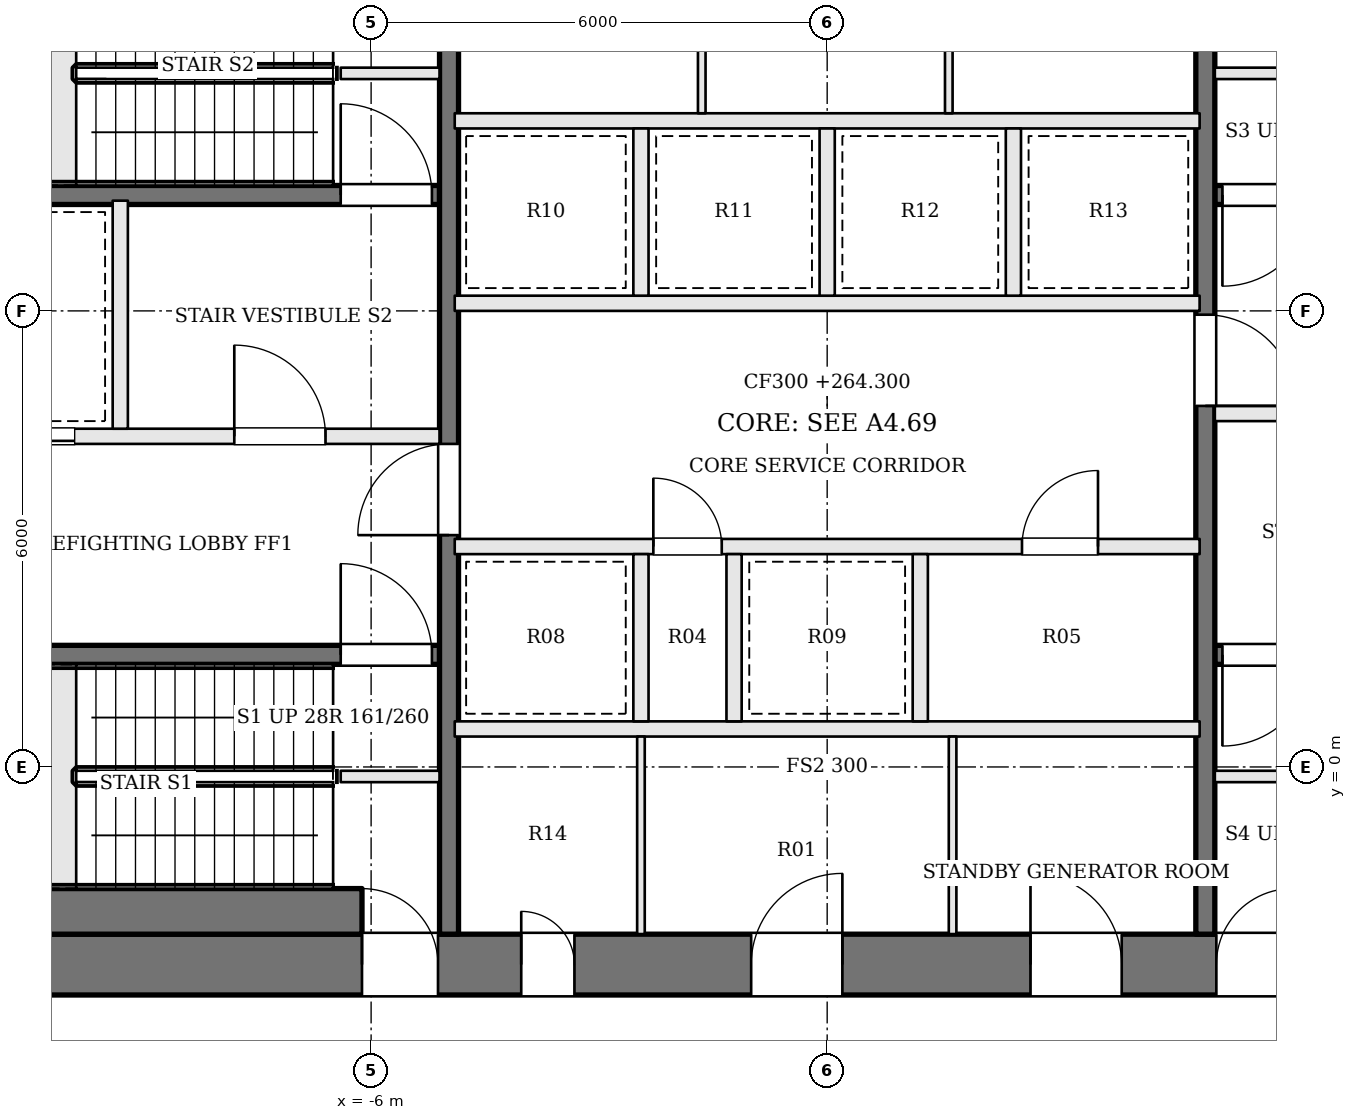
"""IFC4 building model, lengths in metres.
Left out: names, types, materials, properties, quantities, classifications, styles, units other than length and angle.
Written with IfcOpenShell. Run it as: python <this file> out.ifc"""

import sys

from ifc_helpers import new_model, si_unit, direction, frame, frame_2d, origin, place, context, subcontext, project, spatial, rectangle, extrude, element, fill, save


model = new_model("IFC4")
c1 = context("Model", 3, precision=1e-05, world=origin(), true_north=direction((0.0, 1.0)))
c2 = subcontext(c1, "Body", "Model", "MODEL_VIEW")
j1 = project(units=[si_unit("LENGTHUNIT", "METRE"), si_unit("PLANEANGLEUNIT", "RADIAN")], contexts=[c1])
p1 = place(None, origin())
s1 = spatial("IfcSite", under=j1, at=p1, CompositionType="ELEMENT")
p2 = place(p1, origin())
s2 = spatial("IfcBuilding", under=s1, at=p2, CompositionType="ELEMENT")
p3 = place(p2, frame((0.0, 0.0, 264.3)))
s3 = spatial("IfcBuildingStorey", under=s2, at=p3, CompositionType="ELEMENT", Elevation=264.3)
p4 = place(p3, frame((-13.0, -2.6, 0.0), z_axis=(0.0, 0.0, 1.0), x_axis=(1.0, 0.0, 0.0)))
e1 = element("IfcWall", 1, at=p4, inside=s3, PredefinedType="SHEAR", context=c2, shape_type="SweptSolid", body=[
    extrude(rectangle(XDim=26.0, YDim=0.8, at=frame_2d((13.0, 0.0))), origin(), (0.0, 0.0, 1.0), 4.5),
])
p5 = place(p4, frame((8.975, 0.0, 0.0)))
e2 = element("IfcOpeningElement", 2, at=p5, cuts=e1, PredefinedType="OPENING", context=c2, shape_type="SweptSolid", body=[
    extrude(rectangle(XDim=0.7, YDim=2.1, at=frame_2d((0.35, 1.05))), frame((0.0, 0.41, 0.0), z_axis=(0.0, -1.0, 0.0), x_axis=(1.0, 0.0, 0.0)), (0.0, 0.0, 1.0), 0.82),
])
p6 = place(p4, frame((12.0, 0.0, 0.0)))
e3 = element("IfcOpeningElement", 3, at=p6, cuts=e1, PredefinedType="OPENING", context=c2, shape_type="SweptSolid", body=[
    extrude(rectangle(XDim=1.2, YDim=2.1, at=frame_2d((0.6, 1.05))), frame((0.0, 0.41, 0.0), z_axis=(0.0, -1.0, 0.0), x_axis=(1.0, 0.0, 0.0)), (0.0, 0.0, 1.0), 0.82),
])
p7 = place(p4, frame((15.675, 0.0, 0.0)))
e4 = element("IfcOpeningElement", 4, at=p7, cuts=e1, PredefinedType="OPENING", context=c2, shape_type="SweptSolid", body=[
    extrude(rectangle(XDim=1.2, YDim=2.1, at=frame_2d((0.6, 1.05))), frame((0.0, 0.41, 0.0), z_axis=(0.0, -1.0, 0.0), x_axis=(1.0, 0.0, 0.0)), (0.0, 0.0, 1.0), 0.82),
])
p8 = place(p4, frame((6.88, 0.0, 0.0)))
e5 = element("IfcOpeningElement", 5, at=p8, cuts=e1, PredefinedType="OPENING", context=c2, shape_type="SweptSolid", body=[
    extrude(rectangle(XDim=1.0, YDim=2.1, at=frame_2d((0.5, 1.05))), frame((0.0, 0.41, 0.0), z_axis=(0.0, -1.0, 0.0), x_axis=(1.0, 0.0, 0.0)), (0.0, 0.0, 1.0), 0.82),
])
p9 = place(p4, frame((18.12, 0.0, 0.0)))
e6 = element("IfcOpeningElement", 6, at=p9, cuts=e1, PredefinedType="OPENING", context=c2, shape_type="SweptSolid", body=[
    extrude(rectangle(XDim=1.0, YDim=2.1, at=frame_2d((0.5, 1.05))), frame((0.0, 0.41, 0.0), z_axis=(0.0, -1.0, 0.0), x_axis=(1.0, 0.0, 0.0)), (0.0, 0.0, 1.0), 0.82),
])
for number, where, z_axis, x_axis in (
    (7, (-6.4, -0.125, 0.0), (0.0, 0.0, 1.0), (1.0, 0.0, 0.0)),
    (8, (6.4, 9.125, 0.0), (0.0, 0.0, 1.0), (-1.0, 0.0, 0.0)),
    (9, (-6.4, 9.125, 0.0), (0.0, 0.0, 1.0), (1.0, 0.0, 0.0)),
    (10, (6.4, -0.125, 0.0), (0.0, 0.0, 1.0), (-1.0, 0.0, 0.0)),
):
    element("IfcWall", number, at=place(p3, frame(where, z_axis=z_axis, x_axis=x_axis)), inside=s3, PredefinedType="SOLIDWALL", context=c2, shape_type="SweptSolid", body=[
        extrude(rectangle(XDim=1.3, YDim=0.15, at=frame_2d((0.65, 0.0))), origin(), (0.0, 0.0, 1.0), 4.3),
    ])
p10 = place(p3, frame((-12.2, 1.475, 0.0), z_axis=(0.0, 0.0, 1.0), x_axis=(1.0, 0.0, 0.0)))
e11 = element("IfcWall", 11, at=p10, inside=s3, PredefinedType="SOLIDWALL", context=c2, shape_type="SweptSolid", body=[
    extrude(rectangle(XDim=7.1, YDim=0.25, at=frame_2d((3.55, 0.0))), origin(), (0.0, 0.0, 1.0), 4.3),
])
p11 = place(p10, frame((5.8, 0.0, 0.0)))
e12 = element("IfcOpeningElement", 12, at=p11, cuts=e11, PredefinedType="OPENING", context=c2, shape_type="SweptSolid", body=[
    extrude(rectangle(XDim=1.2, YDim=2.1, at=frame_2d((0.6, 1.05))), frame((0.0, 0.135, 0.0), z_axis=(0.0, -1.0, 0.0), x_axis=(1.0, 0.0, 0.0)), (0.0, 0.0, 1.0), 0.27),
])
p12 = place(p3, frame((12.2, 7.525, 0.0), z_axis=(0.0, 0.0, 1.0), x_axis=(-1.0, 0.0, 0.0)))
e13 = element("IfcWall", 13, at=p12, inside=s3, PredefinedType="SOLIDWALL", context=c2, shape_type="SweptSolid", body=[
    extrude(rectangle(XDim=7.1, YDim=0.25, at=frame_2d((3.55, 0.0))), origin(), (0.0, 0.0, 1.0), 4.3),
])
p13 = place(p12, frame((5.8, 0.0, 0.0)))
e14 = element("IfcOpeningElement", 14, at=p13, cuts=e13, PredefinedType="OPENING", context=c2, shape_type="SweptSolid", body=[
    extrude(rectangle(XDim=1.2, YDim=2.1, at=frame_2d((0.6, 1.05))), frame((0.0, 0.135, 0.0), z_axis=(0.0, -1.0, 0.0), x_axis=(1.0, 0.0, 0.0)), (0.0, 0.0, 1.0), 0.27),
])
p14 = place(p3, frame((-12.2, 4.35, 0.0), z_axis=(0.0, 0.0, 1.0), x_axis=(1.0, 0.0, 0.0)))
e15 = element("IfcWall", 15, at=p14, inside=s3, PredefinedType="SOLIDWALL", context=c2, shape_type="SweptSolid", body=[
    extrude(rectangle(XDim=7.1, YDim=0.2, at=frame_2d((3.55, 0.0))), origin(), (0.0, 0.0, 1.0), 4.3),
])
p15 = place(p14, frame((4.4, 0.0, 0.0)))
e16 = element("IfcOpeningElement", 16, at=p15, cuts=e15, PredefinedType="OPENING", context=c2, shape_type="SweptSolid", body=[
    extrude(rectangle(XDim=1.2, YDim=2.1, at=frame_2d((0.6, 1.05))), frame((0.0, 0.11, 0.0), z_axis=(0.0, -1.0, 0.0), x_axis=(1.0, 0.0, 0.0)), (0.0, 0.0, 1.0), 0.22),
])
p16 = place(p14, frame((1.1, 0.0, 0.0)))
e17 = element("IfcOpeningElement", 17, at=p16, cuts=e15, PredefinedType="OPENING", context=c2, shape_type="SweptSolid", body=[
    extrude(rectangle(XDim=1.2, YDim=2.1, at=frame_2d((0.6, 1.05))), frame((0.0, 0.11, 0.0), z_axis=(0.0, -1.0, 0.0), x_axis=(1.0, 0.0, 0.0)), (0.0, 0.0, 1.0), 0.22),
])
p17 = place(p3, frame((12.2, 4.65, 0.0), z_axis=(0.0, 0.0, 1.0), x_axis=(-1.0, 0.0, 0.0)))
e18 = element("IfcWall", 18, at=p17, inside=s3, PredefinedType="SOLIDWALL", context=c2, shape_type="SweptSolid", body=[
    extrude(rectangle(XDim=7.1, YDim=0.2, at=frame_2d((3.55, 0.0))), origin(), (0.0, 0.0, 1.0), 4.3),
])
p18 = place(p17, frame((4.4, 0.0, 0.0)))
e19 = element("IfcOpeningElement", 19, at=p18, cuts=e18, PredefinedType="OPENING", context=c2, shape_type="SweptSolid", body=[
    extrude(rectangle(XDim=1.2, YDim=2.1, at=frame_2d((0.6, 1.05))), frame((0.0, 0.11, 0.0), z_axis=(0.0, -1.0, 0.0), x_axis=(1.0, 0.0, 0.0)), (0.0, 0.0, 1.0), 0.22),
])
p19 = place(p17, frame((1.1, 0.0, 0.0)))
e20 = element("IfcOpeningElement", 20, at=p19, cuts=e18, PredefinedType="OPENING", context=c2, shape_type="SweptSolid", body=[
    extrude(rectangle(XDim=1.2, YDim=2.1, at=frame_2d((0.6, 1.05))), frame((0.0, 0.11, 0.0), z_axis=(0.0, -1.0, 0.0), x_axis=(1.0, 0.0, 0.0)), (0.0, 0.0, 1.0), 0.22),
])
p20 = place(p3, frame((-12.2, 7.525, 0.0), z_axis=(0.0, 0.0, 1.0), x_axis=(1.0, 0.0, 0.0)))
e21 = element("IfcWall", 21, at=p20, inside=s3, PredefinedType="SOLIDWALL", context=c2, shape_type="SweptSolid", body=[
    extrude(rectangle(XDim=7.1, YDim=0.25, at=frame_2d((3.55, 0.0))), origin(), (0.0, 0.0, 1.0), 4.3),
])
p21 = place(p20, frame((5.8, 0.0, 0.0)))
e22 = element("IfcOpeningElement", 22, at=p21, cuts=e21, PredefinedType="OPENING", context=c2, shape_type="SweptSolid", body=[
    extrude(rectangle(XDim=1.2, YDim=2.1, at=frame_2d((0.6, 1.05))), frame((0.0, 0.135, 0.0), z_axis=(0.0, -1.0, 0.0), x_axis=(1.0, 0.0, 0.0)), (0.0, 0.0, 1.0), 0.27),
])
p22 = place(p3, frame((12.2, 1.475, 0.0), z_axis=(0.0, 0.0, 1.0), x_axis=(-1.0, 0.0, 0.0)))
e23 = element("IfcWall", 23, at=p22, inside=s3, PredefinedType="SOLIDWALL", context=c2, shape_type="SweptSolid", body=[
    extrude(rectangle(XDim=7.1, YDim=0.25, at=frame_2d((3.55, 0.0))), origin(), (0.0, 0.0, 1.0), 4.3),
])
p23 = place(p22, frame((5.8, 0.0, 0.0)))
e24 = element("IfcOpeningElement", 24, at=p23, cuts=e23, PredefinedType="OPENING", context=c2, shape_type="SweptSolid", body=[
    extrude(rectangle(XDim=1.2, YDim=2.1, at=frame_2d((0.6, 1.05))), frame((0.0, 0.135, 0.0), z_axis=(0.0, -1.0, 0.0), x_axis=(1.0, 0.0, 0.0)), (0.0, 0.0, 1.0), 0.27),
])
p24 = place(p3, frame((-9.3, 4.45, 0.0), z_axis=(0.0, 0.0, 1.0), x_axis=(0.0, 1.0, 0.0)))
e25 = element("IfcWall", 25, at=p24, inside=s3, PredefinedType="SOLIDWALL", context=c2, shape_type="SweptSolid", body=[
    extrude(rectangle(XDim=3.0, YDim=0.2, at=frame_2d((1.5, 0.0))), origin(), (0.0, 0.0, 1.0), 4.3),
])
p25 = place(p3, frame((-4.975, -2.2, 0.0), z_axis=(0.0, 0.0, 1.0), x_axis=(0.0, 1.0, 0.0)))
e26 = element("IfcWall", 26, at=p25, inside=s3, PredefinedType="SOLIDWALL", context=c2, shape_type="SweptSolid", body=[
    extrude(rectangle(XDim=13.4, YDim=0.25, at=frame_2d((6.7, 0.0))), origin(), (0.0, 0.0, 1.0), 4.3),
])
p26 = place(p25, frame((5.25, 0.0, 0.0)))
e27 = element("IfcOpeningElement", 27, at=p26, cuts=e26, PredefinedType="OPENING", context=c2, shape_type="SweptSolid", body=[
    extrude(rectangle(XDim=1.2, YDim=2.1, at=frame_2d((0.6, 1.05))), frame((0.0, 0.135, 0.0), z_axis=(0.0, -1.0, 0.0), x_axis=(1.0, 0.0, 0.0)), (0.0, 0.0, 1.0), 0.27),
])
p27 = place(p3, frame((4.975, 11.2, 0.0), z_axis=(0.0, 0.0, 1.0), x_axis=(0.0, -1.0, 0.0)))
e28 = element("IfcWall", 28, at=p27, inside=s3, PredefinedType="SOLIDWALL", context=c2, shape_type="SweptSolid", body=[
    extrude(rectangle(XDim=13.4, YDim=0.25, at=frame_2d((6.7, 0.0))), origin(), (0.0, 0.0, 1.0), 4.3),
])
p28 = place(p27, frame((5.25, 0.0, 0.0)))
e29 = element("IfcOpeningElement", 29, at=p28, cuts=e28, PredefinedType="OPENING", context=c2, shape_type="SweptSolid", body=[
    extrude(rectangle(XDim=1.2, YDim=2.1, at=frame_2d((0.6, 1.05))), frame((0.0, 0.135, 0.0), z_axis=(0.0, -1.0, 0.0), x_axis=(1.0, 0.0, 0.0)), (0.0, 0.0, 1.0), 0.27),
])
p29 = place(p3, frame((-12.2, -1.9, 0.0), z_axis=(0.0, 0.0, 1.0), x_axis=(1.0, 0.0, 0.0)))
e30 = element("IfcWall", 30, at=p29, inside=s3, PredefinedType="SOLIDWALL", context=c2, shape_type="SweptSolid", body=[
    extrude(rectangle(XDim=6.08, YDim=0.6, at=frame_2d((3.04, 0.0))), origin(), (0.0, 0.0, 1.0), 4.3),
])
p30 = place(p3, frame((-4.9, 0.5, 0.0), z_axis=(0.0, 0.0, 1.0), x_axis=(1.0, 0.0, 0.0)))
e31 = element("IfcWall", 31, at=p30, inside=s3, PredefinedType="SOLIDWALL", context=c2, shape_type="SweptSolid", body=[
    extrude(rectangle(XDim=9.8, YDim=0.2, at=frame_2d((4.9, 0.0))), origin(), (0.0, 0.0, 1.0), 4.3),
])
p31 = place(p3, frame((-4.9, 2.9, 0.0), z_axis=(0.0, 0.0, 1.0), x_axis=(1.0, 0.0, 0.0)))
e32 = element("IfcWall", 32, at=p31, inside=s3, PredefinedType="SOLIDWALL", context=c2, shape_type="SweptSolid", body=[
    extrude(rectangle(XDim=9.8, YDim=0.2, at=frame_2d((4.9, 0.0))), origin(), (0.0, 0.0, 1.0), 4.3),
])
p32 = place(p31, frame((2.613, 0.0, 0.0)))
e33 = element("IfcOpeningElement", 33, at=p32, cuts=e32, PredefinedType="OPENING", context=c2, shape_type="SweptSolid", body=[
    extrude(rectangle(XDim=0.9, YDim=2.1, at=frame_2d((0.45, 1.05))), frame((0.0, 0.11, 0.0), z_axis=(0.0, -1.0, 0.0), x_axis=(1.0, 0.0, 0.0)), (0.0, 0.0, 1.0), 0.22),
])
p33 = place(p31, frame((7.463, 0.0, 0.0)))
e34 = element("IfcOpeningElement", 34, at=p33, cuts=e32, PredefinedType="OPENING", context=c2, shape_type="SweptSolid", body=[
    extrude(rectangle(XDim=1.0, YDim=2.1, at=frame_2d((0.5, 1.05))), frame((0.0, 0.11, 0.0), z_axis=(0.0, -1.0, 0.0), x_axis=(1.0, 0.0, 0.0)), (0.0, 0.0, 1.0), 0.22),
])
for number, where, z_axis, x_axis in (
    (35, (-4.9, 6.1, 0.0), (0.0, 0.0, 1.0), (1.0, 0.0, 0.0)),
    (36, (-4.9, 8.5, 0.0), (0.0, 0.0, 1.0), (1.0, 0.0, 0.0)),
):
    element("IfcWall", number, at=place(p3, frame(where, z_axis=z_axis, x_axis=x_axis)), inside=s3, PredefinedType="SOLIDWALL", context=c2, shape_type="SweptSolid", body=[
        extrude(rectangle(XDim=9.8, YDim=0.2, at=frame_2d((4.9, 0.0))), origin(), (0.0, 0.0, 1.0), 4.3),
    ])
for number, where, z_axis, x_axis in (
    (37, (-2.45, 0.6, 0.0), (0.0, 0.0, 1.0), (0.0, 1.0, 0.0)),
    (38, (-1.225, 0.6, 0.0), (0.0, 0.0, 1.0), (0.0, 1.0, 0.0)),
    (39, (1.225, 0.6, 0.0), (0.0, 0.0, 1.0), (0.0, 1.0, 0.0)),
    (40, (-2.45, 6.2, 0.0), (0.0, 0.0, 1.0), (0.0, 1.0, 0.0)),
    (41, (0.0, 6.2, 0.0), (0.0, 0.0, 1.0), (0.0, 1.0, 0.0)),
    (42, (2.45, 6.2, 0.0), (0.0, 0.0, 1.0), (0.0, 1.0, 0.0)),
):
    element("IfcWall", number, at=place(p3, frame(where, z_axis=z_axis, x_axis=x_axis)), inside=s3, PredefinedType="SOLIDWALL", context=c2, shape_type="SweptSolid", body=[
        extrude(rectangle(XDim=2.2, YDim=0.2, at=frame_2d((1.1, 0.0))), origin(), (0.0, 0.0, 1.0), 4.3),
    ])
for number, where, z_axis, x_axis in (
    (43, (-2.45, -2.2, 0.0), (0.0, 0.0, 1.0), (0.0, 1.0, 0.0)),
    (44, (1.65, -2.2, 0.0), (0.0, 0.0, 1.0), (0.0, 1.0, 0.0)),
    (45, (-1.65, 8.6, 0.0), (0.0, 0.0, 1.0), (0.0, 1.0, 0.0)),
    (46, (1.6, 8.6, 0.0), (0.0, 0.0, 1.0), (0.0, 1.0, 0.0)),
):
    element("IfcWall", number, at=place(p3, frame(where, z_axis=z_axis, x_axis=x_axis)), inside=s3, PredefinedType="PARTITIONING", context=c2, shape_type="SweptSolid", body=[
        extrude(rectangle(XDim=2.6, YDim=0.1, at=frame_2d((1.3, 0.0))), origin(), (0.0, 0.0, 1.0), 4.3),
    ])
p34 = place(p26, origin())
e47 = element("IfcDoor", 47, at=p34, inside=s3, OperationType="SINGLE_SWING_LEFT", PredefinedType="DOOR", context=c2, shape_type="SweptSolid", body=[
    extrude(rectangle(XDim=1.2, YDim=2.1, at=frame_2d((0.6, 1.05))), frame((0.0, 0.025, 0.0), z_axis=(0.0, -1.0, 0.0), x_axis=(1.0, 0.0, 0.0)), (0.0, 0.0, 1.0), 0.05),
])
fill(e27, e47)
p35 = place(p28, origin())
e48 = element("IfcDoor", 48, at=p35, inside=s3, OperationType="SINGLE_SWING_RIGHT", PredefinedType="DOOR", context=c2, shape_type="SweptSolid", body=[
    extrude(rectangle(XDim=1.2, YDim=2.1, at=frame_2d((0.6, 1.05))), frame((0.0, 0.025, 0.0), z_axis=(0.0, -1.0, 0.0), x_axis=(1.0, 0.0, 0.0)), (0.0, 0.0, 1.0), 0.05),
])
fill(e29, e48)
p36 = place(p15, origin())
e49 = element("IfcDoor", 49, at=p36, inside=s3, OperationType="SINGLE_SWING_LEFT", PredefinedType="DOOR", context=c2, shape_type="SweptSolid", body=[
    extrude(rectangle(XDim=1.2, YDim=2.1, at=frame_2d((0.6, 1.05))), frame((0.0, 0.025, 0.0), z_axis=(0.0, -1.0, 0.0), x_axis=(1.0, 0.0, 0.0)), (0.0, 0.0, 1.0), 0.05),
])
fill(e16, e49)
p37 = place(p11, origin())
e50 = element("IfcDoor", 50, at=p37, inside=s3, OperationType="SINGLE_SWING_LEFT", PredefinedType="DOOR", context=c2, shape_type="SweptSolid", body=[
    extrude(rectangle(XDim=1.2, YDim=2.1, at=frame_2d((0.6, 1.05))), frame((0.0, 0.025, 0.0), z_axis=(0.0, -1.0, 0.0), x_axis=(1.0, 0.0, 0.0)), (0.0, 0.0, 1.0), 0.05),
])
fill(e12, e50)
p38 = place(p13, origin())
e51 = element("IfcDoor", 51, at=p38, inside=s3, OperationType="SINGLE_SWING_RIGHT", PredefinedType="DOOR", context=c2, shape_type="SweptSolid", body=[
    extrude(rectangle(XDim=1.2, YDim=2.1, at=frame_2d((0.6, 1.05))), frame((0.0, 0.025, 0.0), z_axis=(0.0, -1.0, 0.0), x_axis=(1.0, 0.0, 0.0)), (0.0, 0.0, 1.0), 0.05),
])
fill(e14, e51)
p39 = place(p21, origin())
e52 = element("IfcDoor", 52, at=p39, inside=s3, OperationType="SINGLE_SWING_LEFT", PredefinedType="DOOR", context=c2, shape_type="SweptSolid", body=[
    extrude(rectangle(XDim=1.2, YDim=2.1, at=frame_2d((0.6, 1.05))), frame((0.0, 0.025, 0.0), z_axis=(0.0, -1.0, 0.0), x_axis=(1.0, 0.0, 0.0)), (0.0, 0.0, 1.0), 0.05),
])
fill(e22, e52)
p40 = place(p23, origin())
e53 = element("IfcDoor", 53, at=p40, inside=s3, OperationType="SINGLE_SWING_RIGHT", PredefinedType="DOOR", context=c2, shape_type="SweptSolid", body=[
    extrude(rectangle(XDim=1.2, YDim=2.1, at=frame_2d((0.6, 1.05))), frame((0.0, 0.025, 0.0), z_axis=(0.0, -1.0, 0.0), x_axis=(1.0, 0.0, 0.0)), (0.0, 0.0, 1.0), 0.05),
])
fill(e24, e53)
p41 = place(p16, origin())
e54 = element("IfcDoor", 54, at=p41, inside=s3, OperationType="SLIDING_TO_RIGHT", PredefinedType="DOOR", context=c2, shape_type="SweptSolid", body=[
    extrude(rectangle(XDim=1.2, YDim=2.1, at=frame_2d((0.6, 1.05))), frame((0.0, 0.025, 0.0), z_axis=(0.0, -1.0, 0.0), x_axis=(1.0, 0.0, 0.0)), (0.0, 0.0, 1.0), 0.05),
])
fill(e17, e54)
p42 = place(p32, origin())
e55 = element("IfcDoor", 55, at=p42, inside=s3, OperationType="SINGLE_SWING_LEFT", PredefinedType="DOOR", context=c2, shape_type="SweptSolid", body=[
    extrude(rectangle(XDim=0.9, YDim=2.1, at=frame_2d((0.45, 1.05))), frame((0.0, 0.025, 0.0), z_axis=(0.0, -1.0, 0.0), x_axis=(1.0, 0.0, 0.0)), (0.0, 0.0, 1.0), 0.05),
])
fill(e33, e55)
p43 = place(p33, origin())
e56 = element("IfcDoor", 56, at=p43, inside=s3, OperationType="SINGLE_SWING_RIGHT", PredefinedType="DOOR", context=c2, shape_type="SweptSolid", body=[
    extrude(rectangle(XDim=1.0, YDim=2.1, at=frame_2d((0.5, 1.05))), frame((0.0, 0.025, 0.0), z_axis=(0.0, -1.0, 0.0), x_axis=(1.0, 0.0, 0.0)), (0.0, 0.0, 1.0), 0.05),
])
fill(e34, e56)
p44 = place(p5, origin())
e57 = element("IfcDoor", 57, at=p44, inside=s3, OperationType="SINGLE_SWING_LEFT", PredefinedType="DOOR", context=c2, shape_type="SweptSolid", body=[
    extrude(rectangle(XDim=0.7, YDim=2.1, at=frame_2d((0.35, 1.05))), frame((0.0, 0.025, 0.0), z_axis=(0.0, -1.0, 0.0), x_axis=(1.0, 0.0, 0.0)), (0.0, 0.0, 1.0), 0.05),
])
fill(e2, e57)
p45 = place(p6, origin())
e58 = element("IfcDoor", 58, at=p45, inside=s3, OperationType="SINGLE_SWING_RIGHT", PredefinedType="DOOR", context=c2, shape_type="SweptSolid", body=[
    extrude(rectangle(XDim=1.2, YDim=2.1, at=frame_2d((0.6, 1.05))), frame((0.0, 0.025, 0.0), z_axis=(0.0, -1.0, 0.0), x_axis=(1.0, 0.0, 0.0)), (0.0, 0.0, 1.0), 0.05),
])
fill(e3, e58)
p46 = place(p7, origin())
e59 = element("IfcDoor", 59, at=p46, inside=s3, OperationType="SINGLE_SWING_LEFT", PredefinedType="DOOR", context=c2, shape_type="SweptSolid", body=[
    extrude(rectangle(XDim=1.2, YDim=2.1, at=frame_2d((0.6, 1.05))), frame((0.0, 0.025, 0.0), z_axis=(0.0, -1.0, 0.0), x_axis=(1.0, 0.0, 0.0)), (0.0, 0.0, 1.0), 0.05),
])
fill(e4, e59)
p47 = place(p8, origin())
e60 = element("IfcDoor", 60, at=p47, inside=s3, OperationType="SINGLE_SWING_LEFT", PredefinedType="DOOR", context=c2, shape_type="SweptSolid", body=[
    extrude(rectangle(XDim=1.0, YDim=2.1, at=frame_2d((0.5, 1.05))), frame((0.0, 0.025, 0.0), z_axis=(0.0, -1.0, 0.0), x_axis=(1.0, 0.0, 0.0)), (0.0, 0.0, 1.0), 0.05),
])
fill(e5, e60)
p48 = place(p9, origin())
e61 = element("IfcDoor", 61, at=p48, inside=s3, OperationType="SINGLE_SWING_RIGHT", PredefinedType="DOOR", context=c2, shape_type="SweptSolid", body=[
    extrude(rectangle(XDim=1.0, YDim=2.1, at=frame_2d((0.5, 1.05))), frame((0.0, 0.025, 0.0), z_axis=(0.0, -1.0, 0.0), x_axis=(1.0, 0.0, 0.0)), (0.0, 0.0, 1.0), 0.05),
])
fill(e6, e61)
save(model, sys.argv[1])
